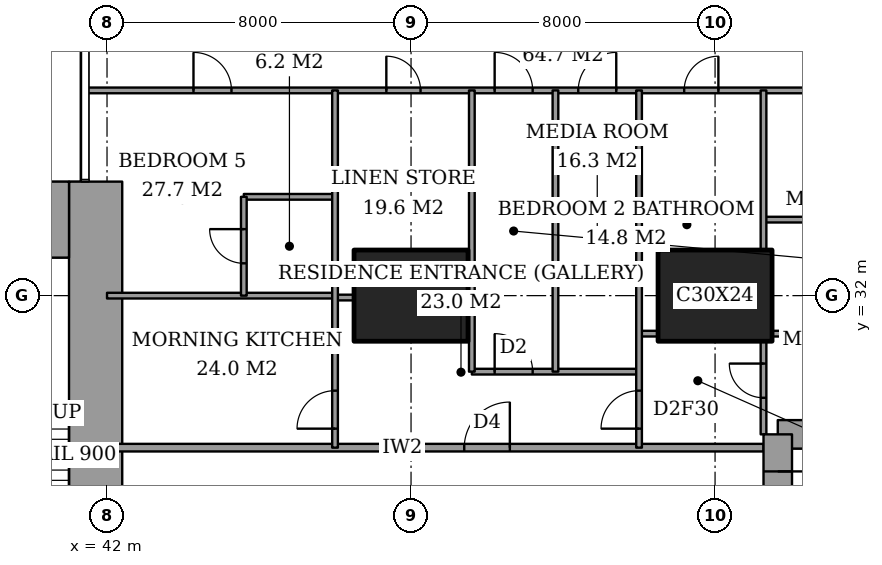
"""IFC4 building model, lengths in metres.
Left out: names, types, materials, properties, quantities, classifications, styles, units other than length and angle.
Written with IfcOpenShell. Run it as: python <this file> out.ifc"""

import sys

from ifc_helpers import new_model, si_unit, direction, frame, frame_2d, origin, origin_2d, place, context, subcontext, project, spatial, rectangle, extrude, element, fill, save


model = new_model("IFC4")
c1 = context("Model", 3, precision=1e-05, world=origin(), true_north=direction((0.0, 1.0)))
c2 = subcontext(c1, "Body", "Model", "MODEL_VIEW")
j1 = project(units=[si_unit("LENGTHUNIT", "METRE"), si_unit("PLANEANGLEUNIT", "RADIAN")], contexts=[c1])
p1 = place(None, origin())
s1 = spatial("IfcSite", under=j1, at=p1, CompositionType="ELEMENT")
p2 = place(p1, origin())
s2 = spatial("IfcBuilding", under=s1, at=p2, CompositionType="ELEMENT")
p3 = place(p2, frame((0.0, 0.0, 185.8)))
s3 = spatial("IfcBuildingStorey", under=s2, at=p3, CompositionType="ELEMENT", Elevation=185.8)
for number, where, z_axis, x_axis in (
    (1, (50.0, 32.0, 0.0), (0.0, 0.0, 1.0), (1.0, 0.0, 0.0)),
    (2, (58.0, 32.0, 0.0), (0.0, 0.0, 1.0), (1.0, 0.0, 0.0)),
):
    element("IfcColumn", number, at=place(p3, frame(where, z_axis=z_axis, x_axis=x_axis)), inside=s3, PredefinedType="COLUMN", context=c2, shape_type="SweptSolid", body=[
        extrude(rectangle(XDim=3.0, YDim=2.4, at=origin_2d()), origin(), (0.0, 0.0, 1.0), 3.6),
    ])
p4 = place(p3, frame((37.85, 34.0, 0.0), z_axis=(0.0, 0.0, 1.0), x_axis=(1.0, 0.0, 0.0)))
e3 = element("IfcWall", 3, at=p4, inside=s3, PredefinedType="SHEAR", context=c2, shape_type="SweptSolid", body=[
    extrude(rectangle(XDim=3.15, YDim=2.0, at=frame_2d((1.575, 0.0))), origin(), (0.0, 0.0, 1.0), 3.6),
])
p5 = place(p3, frame((41.7, 24.85, 0.0), z_axis=(0.0, 0.0, 1.0), x_axis=(0.0, 1.0, 0.0)))
e4 = element("IfcWall", 4, at=p5, inside=s3, PredefinedType="SHEAR", context=c2, shape_type="SweptSolid", body=[
    extrude(rectangle(XDim=10.15, YDim=1.4, at=frame_2d((5.075, 0.0))), origin(), (0.0, 0.0, 1.0), 3.6),
])
p6 = place(p3, frame((64.1, 28.35, 0.0), z_axis=(0.0, 0.0, 1.0), x_axis=(-1.0, 0.0, 0.0)))
e5 = element("IfcWall", 5, at=p6, inside=s3, PredefinedType="SHEAR", context=c2, shape_type="SweptSolid", body=[
    extrude(rectangle(XDim=4.45, YDim=0.75, at=frame_2d((2.225, 0.0))), origin(), (0.0, 0.0, 1.0), 3.6),
])
p7 = place(p3, frame((59.65, 28.35, 0.0), z_axis=(0.0, 0.0, 1.0), x_axis=(0.0, -1.0, 0.0)))
e6 = element("IfcWall", 6, at=p7, inside=s3, PredefinedType="SHEAR", context=c2, shape_type="SweptSolid", body=[
    extrude(rectangle(XDim=8.7, YDim=0.75, at=frame_2d((4.35, 0.0))), origin(), (0.0, 0.0, 1.0), 3.6),
])
p8 = place(p7, frame((0.975, 0.0, 0.0)))
e7 = element("IfcOpeningElement", 7, at=p8, cuts=e6, PredefinedType="OPENING", context=c2, shape_type="SweptSolid", body=[
    extrude(rectangle(XDim=1.0, YDim=2.1, at=frame_2d((0.5, 1.05))), frame((0.0, 0.385, 0.0), z_axis=(0.0, -1.0, 0.0), x_axis=(1.0, 0.0, 0.0)), (0.0, 0.0, 1.0), 0.77),
])
p9 = place(p3, frame((42.0, 28.0, 0.0), z_axis=(0.0, 0.0, 1.0), x_axis=(1.0, 0.0, 0.0)))
e8 = element("IfcWall", 8, at=p9, inside=s3, PredefinedType="PARTITIONING", context=c2, shape_type="SweptSolid", body=[
    extrude(rectangle(XDim=17.275, YDim=0.2, at=frame_2d((8.637, 0.0))), origin(), (0.0, 0.0, 1.0), 3.35),
])
p10 = place(p9, frame((9.4, 0.0, 0.0)))
e9 = element("IfcOpeningElement", 9, at=p10, cuts=e8, PredefinedType="OPENING", context=c2, shape_type="SweptSolid", body=[
    extrude(rectangle(XDim=1.2, YDim=2.4, at=frame_2d((0.6, 1.2))), frame((0.0, 0.11, 0.0), z_axis=(0.0, -1.0, 0.0), x_axis=(1.0, 0.0, 0.0)), (0.0, 0.0, 1.0), 0.22),
])
p11 = place(p3, frame((51.6, 30.0, 0.0), z_axis=(0.0, 0.0, 1.0), x_axis=(1.0, 0.0, 0.0)))
e10 = element("IfcWall", 10, at=p11, inside=s3, PredefinedType="PARTITIONING", context=c2, shape_type="SweptSolid", body=[
    extrude(rectangle(XDim=4.4, YDim=0.15, at=frame_2d((2.2, 0.0))), origin(), (0.0, 0.0, 1.0), 3.35),
])
p12 = place(p11, frame((0.6, 0.0, 0.0)))
e11 = element("IfcOpeningElement", 11, at=p12, cuts=e10, PredefinedType="OPENING", context=c2, shape_type="SweptSolid", body=[
    extrude(rectangle(XDim=1.0, YDim=2.1, at=frame_2d((0.5, 1.05))), frame((0.0, 0.085, 0.0), z_axis=(0.0, -1.0, 0.0), x_axis=(1.0, 0.0, 0.0)), (0.0, 0.0, 1.0), 0.17),
])
p13 = place(p3, frame((56.0, 31.0, 0.0), z_axis=(0.0, 0.0, 1.0), x_axis=(1.0, 0.0, 0.0)))
e12 = element("IfcWall", 12, at=p13, inside=s3, PredefinedType="PARTITIONING", context=c2, shape_type="SweptSolid", body=[
    extrude(rectangle(XDim=0.5, YDim=0.15, at=frame_2d((0.25, 0.0))), origin(), (0.0, 0.0, 1.0), 3.35),
])
p14 = place(p3, frame((59.5, 31.0, 0.0), z_axis=(0.0, 0.0, 1.0), x_axis=(1.0, 0.0, 0.0)))
e13 = element("IfcWall", 13, at=p14, inside=s3, PredefinedType="PARTITIONING", context=c2, shape_type="SweptSolid", body=[
    extrude(rectangle(XDim=6.95, YDim=0.15, at=frame_2d((3.475, 0.0))), origin(), (0.0, 0.0, 1.0), 3.35),
])
p15 = place(p3, frame((48.0, 31.95, 0.0), z_axis=(0.0, 0.0, 1.0), x_axis=(1.0, 0.0, 0.0)))
e14 = element("IfcWall", 14, at=p15, inside=s3, PredefinedType="PARTITIONING", context=c2, shape_type="SweptSolid", body=[
    extrude(rectangle(XDim=0.5, YDim=0.15, at=frame_2d((0.25, 0.0))), origin(), (0.0, 0.0, 1.0), 2.634),
])
p16 = place(p3, frame((42.0, 32.0, 0.0), z_axis=(0.0, 0.0, 1.0), x_axis=(1.0, 0.0, 0.0)))
e15 = element("IfcWall", 15, at=p16, inside=s3, PredefinedType="PARTITIONING", context=c2, shape_type="SweptSolid", body=[
    extrude(rectangle(XDim=6.0, YDim=0.15, at=frame_2d((3.0, 0.0))), origin(), (0.0, 0.0, 1.0), 2.634),
])
p17 = place(p3, frame((59.275, 34.0, 0.0), z_axis=(0.0, 0.0, 1.0), x_axis=(1.0, 0.0, 0.0)))
e16 = element("IfcWall", 16, at=p17, inside=s3, PredefinedType="PARTITIONING", context=c2, shape_type="SweptSolid", body=[
    extrude(rectangle(XDim=2.6, YDim=0.15, at=frame_2d((1.3, 0.0))), origin(), (0.0, 0.0, 1.0), 3.35),
])
p18 = place(p3, frame((45.6, 34.6, 0.0), z_axis=(0.0, 0.0, 1.0), x_axis=(1.0, 0.0, 0.0)))
e17 = element("IfcWall", 17, at=p18, inside=s3, PredefinedType="PARTITIONING", context=c2, shape_type="SweptSolid", body=[
    extrude(rectangle(XDim=2.4, YDim=0.15, at=frame_2d((1.2, 0.0))), origin(), (0.0, 0.0, 1.0), 3.35),
])
p19 = place(p3, frame((41.439, 37.4, 0.0), z_axis=(0.0, 0.0, 1.0), x_axis=(1.0, 0.0, 0.0)))
e18 = element("IfcWall", 18, at=p19, inside=s3, PredefinedType="PARTITIONING", context=c2, shape_type="SweptSolid", body=[
    extrude(rectangle(XDim=25.011, YDim=0.15, at=frame_2d((12.505, 0.0))), origin(), (0.0, 0.0, 1.0), 3.35),
])
p20 = place(p19, frame((10.761, 0.0, 0.0)))
e19 = element("IfcOpeningElement", 19, at=p20, cuts=e18, PredefinedType="OPENING", context=c2, shape_type="SweptSolid", body=[
    extrude(rectangle(XDim=1.0, YDim=2.1, at=frame_2d((0.5, 1.05))), frame((0.0, 0.085, 0.0), z_axis=(0.0, -1.0, 0.0), x_axis=(1.0, 0.0, 0.0)), (0.0, 0.0, 1.0), 0.17),
])
p21 = place(p19, frame((20.924, 0.0, 0.0)))
e20 = element("IfcOpeningElement", 20, at=p21, cuts=e18, PredefinedType="OPENING", context=c2, shape_type="SweptSolid", body=[
    extrude(rectangle(XDim=1.0, YDim=2.1, at=frame_2d((0.5, 1.05))), frame((0.0, 0.085, 0.0), z_axis=(0.0, -1.0, 0.0), x_axis=(1.0, 0.0, 0.0)), (0.0, 0.0, 1.0), 0.17),
])
p22 = place(p19, frame((15.749, 0.0, 0.0)))
e21 = element("IfcOpeningElement", 21, at=p22, cuts=e18, PredefinedType="OPENING", context=c2, shape_type="SweptSolid", body=[
    extrude(rectangle(XDim=0.9, YDim=2.1, at=frame_2d((0.45, 1.05))), frame((0.0, 0.085, 0.0), z_axis=(0.0, -1.0, 0.0), x_axis=(1.0, 0.0, 0.0)), (0.0, 0.0, 1.0), 0.17),
])
p23 = place(p19, frame((12.961, 0.0, 0.0)))
e22 = element("IfcOpeningElement", 22, at=p23, cuts=e18, PredefinedType="OPENING", context=c2, shape_type="SweptSolid", body=[
    extrude(rectangle(XDim=1.0, YDim=2.1, at=frame_2d((0.5, 1.05))), frame((0.0, 0.085, 0.0), z_axis=(0.0, -1.0, 0.0), x_axis=(1.0, 0.0, 0.0)), (0.0, 0.0, 1.0), 0.17),
])
p24 = place(p19, frame((7.911, 0.0, 0.0)))
e23 = element("IfcOpeningElement", 23, at=p24, cuts=e18, PredefinedType="OPENING", context=c2, shape_type="SweptSolid", body=[
    extrude(rectangle(XDim=0.9, YDim=2.1, at=frame_2d((0.45, 1.05))), frame((0.0, 0.085, 0.0), z_axis=(0.0, -1.0, 0.0), x_axis=(1.0, 0.0, 0.0)), (0.0, 0.0, 1.0), 0.17),
])
p25 = place(p19, frame((2.836, 0.0, 0.0)))
e24 = element("IfcOpeningElement", 24, at=p25, cuts=e18, PredefinedType="OPENING", context=c2, shape_type="SweptSolid", body=[
    extrude(rectangle(XDim=1.0, YDim=2.1, at=frame_2d((0.5, 1.05))), frame((0.0, 0.085, 0.0), z_axis=(0.0, -1.0, 0.0), x_axis=(1.0, 0.0, 0.0)), (0.0, 0.0, 1.0), 0.17),
])
p26 = place(p3, frame((45.6, 32.0, 0.0), z_axis=(0.0, 0.0, 1.0), x_axis=(0.0, 1.0, 0.0)))
e25 = element("IfcWall", 25, at=p26, inside=s3, PredefinedType="PARTITIONING", context=c2, shape_type="SweptSolid", body=[
    extrude(rectangle(XDim=2.6, YDim=0.15, at=frame_2d((1.3, 0.0))), origin(), (0.0, 0.0, 1.0), 3.35),
])
p27 = place(p26, frame((0.85, 0.0, 0.0)))
e26 = element("IfcOpeningElement", 26, at=p27, cuts=e25, PredefinedType="OPENING", context=c2, shape_type="SweptSolid", body=[
    extrude(rectangle(XDim=0.9, YDim=2.1, at=frame_2d((0.45, 1.05))), frame((0.0, 0.085, 0.0), z_axis=(0.0, -1.0, 0.0), x_axis=(1.0, 0.0, 0.0)), (0.0, 0.0, 1.0), 0.17),
])
p28 = place(p3, frame((48.0, 28.0, 0.0), z_axis=(0.0, 0.0, 1.0), x_axis=(0.0, 1.0, 0.0)))
e27 = element("IfcWall", 27, at=p28, inside=s3, PredefinedType="PARTITIONING", context=c2, shape_type="SweptSolid", body=[
    extrude(rectangle(XDim=9.4, YDim=0.15, at=frame_2d((4.7, 0.0))), origin(), (0.0, 0.0, 1.0), 3.35),
])
p29 = place(p28, frame((0.5, 0.0, 0.0)))
e28 = element("IfcOpeningElement", 28, at=p29, cuts=e27, PredefinedType="OPENING", context=c2, shape_type="SweptSolid", body=[
    extrude(rectangle(XDim=1.0, YDim=2.1, at=frame_2d((0.5, 1.05))), frame((0.0, 0.085, 0.0), z_axis=(0.0, -1.0, 0.0), x_axis=(1.0, 0.0, 0.0)), (0.0, 0.0, 1.0), 0.17),
])
for number, where, z_axis, x_axis in (
    (29, (51.6, 30.0, 0.0), (0.0, 0.0, 1.0), (0.0, 1.0, 0.0)),
    (30, (53.8, 30.0, 0.0), (0.0, 0.0, 1.0), (0.0, 1.0, 0.0)),
):
    element("IfcWall", number, at=place(p3, frame(where, z_axis=z_axis, x_axis=x_axis)), inside=s3, PredefinedType="PARTITIONING", context=c2, shape_type="SweptSolid", body=[
        extrude(rectangle(XDim=7.4, YDim=0.15, at=frame_2d((3.7, 0.0))), origin(), (0.0, 0.0, 1.0), 3.35),
    ])
p30 = place(p3, frame((56.0, 28.0, 0.0), z_axis=(0.0, 0.0, 1.0), x_axis=(0.0, 1.0, 0.0)))
e31 = element("IfcWall", 31, at=p30, inside=s3, PredefinedType="PARTITIONING", context=c2, shape_type="SweptSolid", body=[
    extrude(rectangle(XDim=9.4, YDim=0.15, at=frame_2d((4.7, 0.0))), origin(), (0.0, 0.0, 1.0), 3.35),
])
p31 = place(p30, frame((0.5, 0.0, 0.0)))
e32 = element("IfcOpeningElement", 32, at=p31, cuts=e31, PredefinedType="OPENING", context=c2, shape_type="SweptSolid", body=[
    extrude(rectangle(XDim=1.0, YDim=2.1, at=frame_2d((0.5, 1.05))), frame((0.0, 0.085, 0.0), z_axis=(0.0, -1.0, 0.0), x_axis=(1.0, 0.0, 0.0)), (0.0, 0.0, 1.0), 0.17),
])
p32 = place(p3, frame((59.275, 28.35, 0.0), z_axis=(0.0, 0.0, 1.0), x_axis=(0.0, 1.0, 0.0)))
e33 = element("IfcWall", 33, at=p32, inside=s3, PredefinedType="PARTITIONING", context=c2, shape_type="SweptSolid", body=[
    extrude(rectangle(XDim=2.45, YDim=0.15, at=frame_2d((1.225, 0.0))), origin(), (0.0, 0.0, 1.0), 3.35),
])
p33 = place(p32, frame((0.962, 0.0, 0.0)))
e34 = element("IfcOpeningElement", 34, at=p33, cuts=e33, PredefinedType="OPENING", context=c2, shape_type="SweptSolid", body=[
    extrude(rectangle(XDim=0.9, YDim=2.1, at=frame_2d((0.45, 1.05))), frame((0.0, 0.085, 0.0), z_axis=(0.0, -1.0, 0.0), x_axis=(1.0, 0.0, 0.0)), (0.0, 0.0, 1.0), 0.17),
])
p34 = place(p3, frame((59.275, 33.2, 0.0), z_axis=(0.0, 0.0, 1.0), x_axis=(0.0, 1.0, 0.0)))
e35 = element("IfcWall", 35, at=p34, inside=s3, PredefinedType="PARTITIONING", context=c2, shape_type="SweptSolid", body=[
    extrude(rectangle(XDim=4.2, YDim=0.15, at=frame_2d((2.1, 0.0))), origin(), (0.0, 0.0, 1.0), 3.35),
])
p35 = place(p20, origin())
e36 = element("IfcDoor", 36, at=p35, inside=s3, OperationType="SINGLE_SWING_RIGHT", PredefinedType="DOOR", context=c2, shape_type="SweptSolid", body=[
    extrude(rectangle(XDim=1.0, YDim=2.1, at=frame_2d((0.5, 1.05))), frame((0.0, 0.025, 0.0), z_axis=(0.0, -1.0, 0.0), x_axis=(1.0, 0.0, 0.0)), (0.0, 0.0, 1.0), 0.05),
])
fill(e19, e36)
p36 = place(p33, origin())
e37 = element("IfcDoor", 37, at=p36, inside=s3, OperationType="SINGLE_SWING_LEFT", PredefinedType="DOOR", context=c2, shape_type="SweptSolid", body=[
    extrude(rectangle(XDim=0.9, YDim=2.1, at=frame_2d((0.45, 1.05))), frame((0.0, 0.025, 0.0), z_axis=(0.0, -1.0, 0.0), x_axis=(1.0, 0.0, 0.0)), (0.0, 0.0, 1.0), 0.05),
])
fill(e34, e37)
p37 = place(p22, origin())
e38 = element("IfcDoor", 38, at=p37, inside=s3, OperationType="SINGLE_SWING_LEFT", PredefinedType="DOOR", context=c2, shape_type="SweptSolid", body=[
    extrude(rectangle(XDim=0.9, YDim=2.1, at=frame_2d((0.45, 1.05))), frame((0.0, 0.025, 0.0), z_axis=(0.0, -1.0, 0.0), x_axis=(1.0, 0.0, 0.0)), (0.0, 0.0, 1.0), 0.05),
])
fill(e21, e38)
p38 = place(p31, origin())
e39 = element("IfcDoor", 39, at=p38, inside=s3, OperationType="SINGLE_SWING_RIGHT", PredefinedType="DOOR", context=c2, shape_type="SweptSolid", body=[
    extrude(rectangle(XDim=1.0, YDim=2.1, at=frame_2d((0.5, 1.05))), frame((0.0, 0.025, 0.0), z_axis=(0.0, -1.0, 0.0), x_axis=(1.0, 0.0, 0.0)), (0.0, 0.0, 1.0), 0.05),
])
fill(e32, e39)
p39 = place(p10, origin())
e40 = element("IfcDoor", 40, at=p39, inside=s3, OperationType="SINGLE_SWING_LEFT", PredefinedType="DOOR", context=c2, shape_type="SweptSolid", body=[
    extrude(rectangle(XDim=1.2, YDim=2.4, at=frame_2d((0.6, 1.2))), frame((0.0, 0.025, 0.0), z_axis=(0.0, -1.0, 0.0), x_axis=(1.0, 0.0, 0.0)), (0.0, 0.0, 1.0), 0.05),
])
fill(e9, e40)
p40 = place(p23, origin())
e41 = element("IfcDoor", 41, at=p40, inside=s3, OperationType="SINGLE_SWING_LEFT", PredefinedType="DOOR", context=c2, shape_type="SweptSolid", body=[
    extrude(rectangle(XDim=1.0, YDim=2.1, at=frame_2d((0.5, 1.05))), frame((0.0, 0.025, 0.0), z_axis=(0.0, -1.0, 0.0), x_axis=(1.0, 0.0, 0.0)), (0.0, 0.0, 1.0), 0.05),
])
fill(e22, e41)
p41 = place(p12, origin())
e42 = element("IfcDoor", 42, at=p41, inside=s3, OperationType="SINGLE_SWING_RIGHT", PredefinedType="DOOR", context=c2, shape_type="SweptSolid", body=[
    extrude(rectangle(XDim=1.0, YDim=2.1, at=frame_2d((0.5, 1.05))), frame((0.0, 0.025, 0.0), z_axis=(0.0, -1.0, 0.0), x_axis=(1.0, 0.0, 0.0)), (0.0, 0.0, 1.0), 0.05),
])
fill(e11, e42)
p42 = place(p24, origin())
e43 = element("IfcDoor", 43, at=p42, inside=s3, OperationType="SINGLE_SWING_RIGHT", PredefinedType="DOOR", context=c2, shape_type="SweptSolid", body=[
    extrude(rectangle(XDim=0.9, YDim=2.1, at=frame_2d((0.45, 1.05))), frame((0.0, 0.025, 0.0), z_axis=(0.0, -1.0, 0.0), x_axis=(1.0, 0.0, 0.0)), (0.0, 0.0, 1.0), 0.05),
])
fill(e23, e43)
p43 = place(p27, origin())
e44 = element("IfcDoor", 44, at=p43, inside=s3, OperationType="SINGLE_SWING_LEFT", PredefinedType="DOOR", context=c2, shape_type="SweptSolid", body=[
    extrude(rectangle(XDim=0.9, YDim=2.1, at=frame_2d((0.45, 1.05))), frame((0.0, 0.025, 0.0), z_axis=(0.0, -1.0, 0.0), x_axis=(1.0, 0.0, 0.0)), (0.0, 0.0, 1.0), 0.05),
])
fill(e26, e44)
p44 = place(p25, origin())
e45 = element("IfcDoor", 45, at=p44, inside=s3, OperationType="SINGLE_SWING_RIGHT", PredefinedType="DOOR", context=c2, shape_type="SweptSolid", body=[
    extrude(rectangle(XDim=1.0, YDim=2.1, at=frame_2d((0.5, 1.05))), frame((0.0, 0.025, 0.0), z_axis=(0.0, -1.0, 0.0), x_axis=(1.0, 0.0, 0.0)), (0.0, 0.0, 1.0), 0.05),
])
fill(e24, e45)
p45 = place(p29, origin())
e46 = element("IfcDoor", 46, at=p45, inside=s3, OperationType="SINGLE_SWING_RIGHT", PredefinedType="DOOR", context=c2, shape_type="SweptSolid", body=[
    extrude(rectangle(XDim=1.0, YDim=2.1, at=frame_2d((0.5, 1.05))), frame((0.0, 0.025, 0.0), z_axis=(0.0, -1.0, 0.0), x_axis=(1.0, 0.0, 0.0)), (0.0, 0.0, 1.0), 0.05),
])
fill(e28, e46)
p46 = place(p8, origin())
e47 = element("IfcDoor", 47, at=p46, inside=s3, OperationType="SINGLE_SWING_RIGHT", PredefinedType="DOOR", context=c2, shape_type="SweptSolid", body=[
    extrude(rectangle(XDim=1.0, YDim=2.1, at=frame_2d((0.5, 1.05))), frame((0.0, 0.025, 0.0), z_axis=(0.0, -1.0, 0.0), x_axis=(1.0, 0.0, 0.0)), (0.0, 0.0, 1.0), 0.05),
])
fill(e7, e47)
save(model, sys.argv[1])
